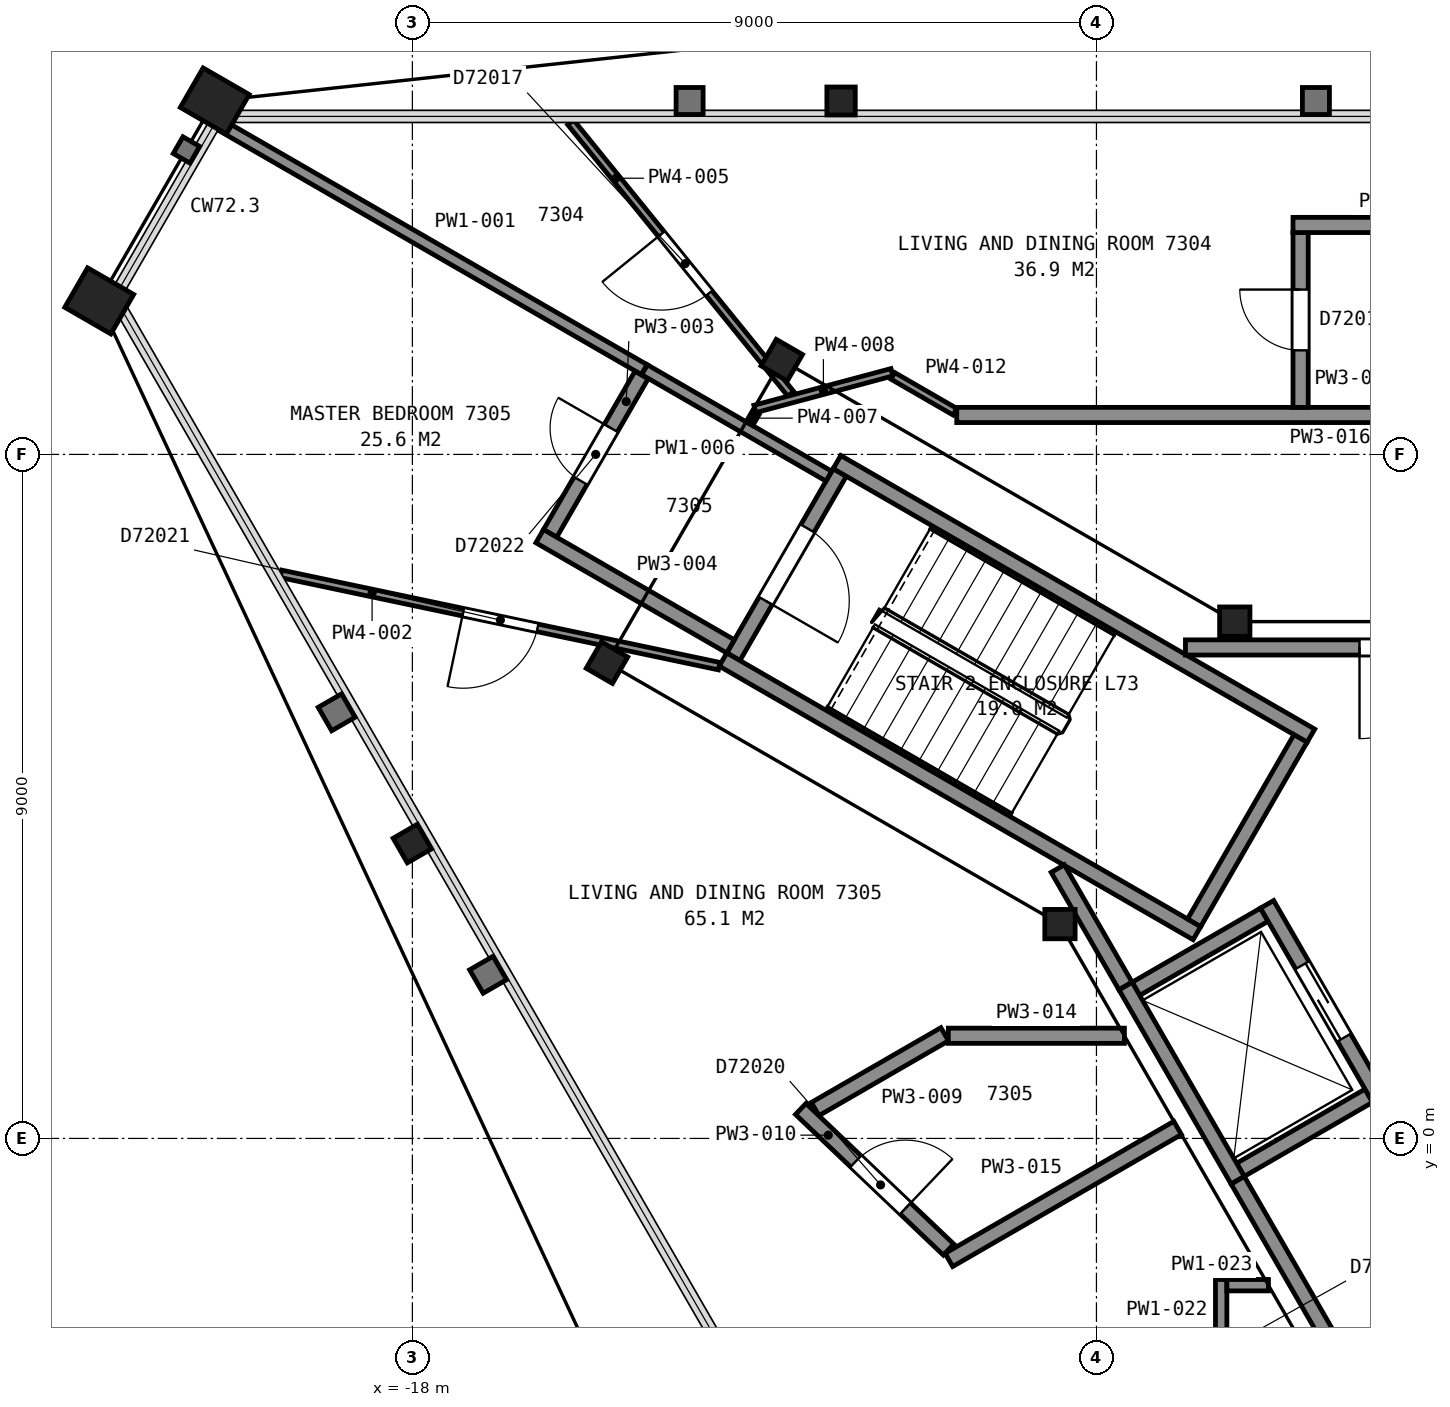
"""IFC4 building model, lengths in metres.
Left out: names, types, materials, properties, quantities, classifications, styles, units other than length and angle.
Written with IfcOpenShell. Run it as: python <this file> out.ifc"""

import sys

from ifc_helpers import new_model, si_unit, direction, frame, frame_2d, origin, origin_2d, place, context, subcontext, project, spatial, rectangle, hollow_rectangle, i_section, extrude, element, fill, save


model = new_model("IFC4")
c1 = context("Model", 3, precision=1e-05, world=origin(), true_north=direction((0.0, 1.0)))
c2 = subcontext(c1, "Body", "Model", "MODEL_VIEW")
j1 = project(units=[si_unit("LENGTHUNIT", "METRE"), si_unit("PLANEANGLEUNIT", "RADIAN")], contexts=[c1])
p1 = place(None, origin())
s1 = spatial("IfcSite", under=j1, at=p1, CompositionType="ELEMENT")
p2 = place(p1, origin())
s2 = spatial("IfcBuilding", under=s1, at=p2, CompositionType="ELEMENT")
p3 = place(p2, frame((0.0, 0.0, 289.9)))
s3 = spatial("IfcBuildingStorey", under=s2, at=p3, CompositionType="ELEMENT", Elevation=289.9)
p4 = place(p3, frame((-12.36, 13.65, 0.0), z_axis=(0.0, 0.0, 1.0), x_axis=(1.0, 0.0, 0.0)))
e1 = element("IfcColumn", 1, at=p4, inside=s3, PredefinedType="COLUMN", context=c2, shape_type="SweptSolid", body=[
    extrude(i_section(OverallWidth=0.373, OverallDepth=0.368, WebThickness=0.015, FlangeThickness=0.024, FilletRadius=0.015, at=origin_2d()), origin(), (0.0, 0.0, 1.0), 3.7),
])
for number, where, z_axis, x_axis in (
    (2, (-20.6, 13.65, 0.0), (0.0, 0.0, 1.0), (0.5, 0.866, 0.0)),
    (3, (-22.12, 11.02, 0.0), (0.0, 0.0, 1.0), (0.5, 0.866, 0.0)),
):
    element("IfcColumn", number, at=place(p3, frame(where, z_axis=z_axis, x_axis=x_axis)), inside=s3, PredefinedType="COLUMN", context=c2, shape_type="SweptSolid", body=[
        extrude(hollow_rectangle(XDim=0.6, YDim=0.7, WallThickness=0.04, at=origin_2d()), origin(), (0.0, 0.0, 1.0), 3.7),
    ])
p5 = place(p3, frame((-18.0, 3.88, 0.0), z_axis=(0.0, 0.0, 1.0), x_axis=(-0.5, 0.866025403784, 0.0)))
e4 = element("IfcColumn", 4, at=p5, inside=s3, PredefinedType="COLUMN", context=c2, shape_type="SweptSolid", body=[
    extrude(i_section(OverallWidth=0.373, OverallDepth=0.368, WebThickness=0.015, FlangeThickness=0.024, FilletRadius=0.015, at=origin_2d()), origin(), (0.0, 0.0, 1.0), 3.7),
])
p6 = place(p3, frame((-7.18, 6.8, 0.0), z_axis=(0.0, 0.0, 1.0), x_axis=(1.0, 0.0, 0.0)))
e5 = element("IfcColumn", 5, at=p6, inside=s3, PredefinedType="COLUMN", context=c2, shape_type="SweptSolid", body=[
    extrude(i_section(OverallWidth=0.399, OverallDepth=0.386, WebThickness=0.021, FlangeThickness=0.033, FilletRadius=0.015, at=origin_2d()), origin(), (0.0, 0.0, 1.0), 3.7),
])
for number, where, z_axis, x_axis in (
    (6, (-13.14, 10.24, 0.0), (0.0, 0.0, 1.0), (0.5, 0.866, 0.0)),
    (7, (-15.44, 6.26, 0.0), (0.0, 0.0, 1.0), (0.5, 0.866, 0.0)),
):
    element("IfcColumn", number, at=place(p3, frame(where, z_axis=z_axis, x_axis=x_axis)), inside=s3, PredefinedType="COLUMN", context=c2, shape_type="SweptSolid", body=[
        extrude(i_section(OverallWidth=0.401, OverallDepth=0.399, WebThickness=0.025, FlangeThickness=0.04, FilletRadius=0.015, at=origin_2d()), origin(), (0.0, 0.0, 1.0), 3.7),
    ])
p7 = place(p3, frame((-9.48, 2.82, 0.0), z_axis=(0.0, 0.0, 1.0), x_axis=(1.0, 0.0, 0.0)))
e8 = element("IfcColumn", 8, at=p7, inside=s3, PredefinedType="COLUMN", context=c2, shape_type="SweptSolid", body=[
    extrude(i_section(OverallWidth=0.399, OverallDepth=0.386, WebThickness=0.021, FlangeThickness=0.033, FilletRadius=0.015, at=origin_2d()), origin(), (0.0, 0.0, 1.0), 3.7),
])
p8 = place(p3, frame((-12.377, 8.762, 0.0), z_axis=(0.0, 0.0, 1.0), x_axis=(-0.500049511043, -0.865996816683, 0.0)))
e9 = element("IfcWall", 9, at=p8, inside=s3, PredefinedType="PARTITIONING", context=c2, shape_type="SweptSolid", body=[
    extrude(rectangle(XDim=2.8, YDim=0.2, at=frame_2d((1.4, 0.0))), origin(), (0.0, 0.0, 1.0), 3.45),
])
p9 = place(p8, frame((0.85, 0.0, 0.0)))
e10 = element("IfcOpeningElement", 10, at=p9, cuts=e9, PredefinedType="OPENING", context=c2, shape_type="SweptSolid", body=[
    extrude(rectangle(XDim=1.1, YDim=2.1, at=frame_2d((0.55, 1.05))), frame((0.0, 0.11, 0.0), z_axis=(0.0, -1.0, 0.0), x_axis=(1.0, 0.0, 0.0)), (0.0, 0.0, 1.0), 0.22),
])
for number, where, z_axis, x_axis in (
    (11, (-7.678, 2.701, 0.0), (0.0, 0.0, 1.0), (-0.866, 0.5, 0.0)),
    (12, (-6.178, 5.299, 0.0), (0.0, 0.0, 1.0), (-0.866, 0.5, 0.0)),
):
    element("IfcWall", number, at=place(p3, frame(where, z_axis=z_axis, x_axis=x_axis)), inside=s3, PredefinedType="PARTITIONING", context=c2, shape_type="SweptSolid", body=[
        extrude(rectangle(XDim=7.2, YDim=0.2, at=frame_2d((3.6, 0.0))), origin(), (0.0, 0.0, 1.0), 3.45),
    ])
p10 = place(p3, frame((-6.315, 5.262, 0.0), z_axis=(0.0, 0.0, 1.0), x_axis=(-0.500049511043, -0.865996816683, 0.0)))
e13 = element("IfcWall", 13, at=p10, inside=s3, PredefinedType="PARTITIONING", context=c2, shape_type="SweptSolid", body=[
    extrude(rectangle(XDim=2.8, YDim=0.2, at=frame_2d((1.4, 0.0))), origin(), (0.0, 0.0, 1.0), 3.45),
])
for number, where, z_axis, x_axis in (
    (14, (-7.105, -0.413, 0.0), (0.0, 0.0, 1.0), (0.866, 0.5, 0.0)),
    (15, (-8.48, 1.969, 0.0), (0.0, 0.0, 1.0), (0.866, 0.5, 0.0)),
):
    element("IfcWall", number, at=place(p3, frame(where, z_axis=z_axis, x_axis=x_axis)), inside=s3, PredefinedType="PARTITIONING", context=c2, shape_type="SweptSolid", body=[
        extrude(rectangle(XDim=1.95, YDim=0.2, at=frame_2d((0.975, 0.0))), origin(), (0.0, 0.0, 1.0), 3.7),
    ])
p11 = place(p3, frame((-5.28, 0.525, 0.0), z_axis=(0.0, 0.0, 1.0), x_axis=(-0.500037662692, 0.866003658127, 0.0)))
e16 = element("IfcWall", 16, at=p11, inside=s3, PredefinedType="PARTITIONING", context=c2, shape_type="SweptSolid", body=[
    extrude(rectangle(XDim=2.95, YDim=0.2, at=frame_2d((1.475, 0.0))), origin(), (0.0, 0.0, 1.0), 3.7),
])
p12 = place(p11, frame((0.925, 0.0, 0.0)))
e17 = element("IfcOpeningElement", 17, at=p12, cuts=e16, PredefinedType="OPENING", context=c2, shape_type="SweptSolid", body=[
    extrude(rectangle(XDim=1.1, YDim=2.1, at=frame_2d((0.55, 1.05))), frame((0.0, 0.11, 0.0), z_axis=(0.0, -1.0, 0.0), x_axis=(1.0, 0.0, 0.0)), (0.0, 0.0, 1.0), 0.22),
])
p13 = place(p3, frame((-7.142, -0.55, 0.0), z_axis=(0.0, 0.0, 1.0), x_axis=(-0.49997559174, 0.866039495442, 0.0)))
e18 = element("IfcWall", 18, at=p13, inside=s3, PredefinedType="PARTITIONING", context=c2, shape_type="SweptSolid", body=[
    extrude(rectangle(XDim=2.95, YDim=0.2, at=frame_2d((1.475, 0.0))), origin(), (0.0, 0.0, 1.0), 3.7),
])
p14 = place(p3, frame((-9.509, 3.551, 0.0), z_axis=(0.0, 0.0, 1.0), x_axis=(0.499999136801, -0.866025902152, 0.0)))
e19 = element("IfcWall", 19, at=p14, inside=s3, PredefinedType="PARTITIONING", context=c2, shape_type="SweptSolid", body=[
    extrude(rectangle(XDim=1.782, YDim=0.2, at=frame_2d((0.891, 0.0))), origin(), (0.0, 0.0, 1.0), 3.45),
])
p15 = place(p3, frame((7.829, 6.46, 0.0), z_axis=(0.0, 0.0, 1.0), x_axis=(-1.0, 0.0, 0.0)))
e20 = element("IfcWall", 20, at=p15, inside=s3, PredefinedType="PARTITIONING", context=c2, shape_type="SweptSolid", body=[
    extrude(rectangle(XDim=15.658, YDim=0.2, at=frame_2d((7.829, 0.0))), origin(), (0.0, 0.0, 1.0), 3.45),
])
p16 = place(p15, frame((12.168, 0.0, 0.0)))
e21 = element("IfcOpeningElement", 21, at=p16, cuts=e20, PredefinedType="OPENING", context=c2, shape_type="SweptSolid", body=[
    extrude(rectangle(XDim=1.2, YDim=2.1, at=frame_2d((0.6, 1.05))), frame((0.0, 0.11, 0.0), z_axis=(0.0, -1.0, 0.0), x_axis=(1.0, 0.0, 0.0)), (0.0, 0.0, 1.0), 0.22),
])
p17 = place(p3, frame((-7.141, -0.551, 0.0), z_axis=(0.0, 0.0, 1.0), x_axis=(0.500001302854, -0.86602465158, 0.0)))
e22 = element("IfcWall", 22, at=p17, inside=s3, PredefinedType="PARTITIONING", context=c2, shape_type="SweptSolid", body=[
    extrude(rectangle(XDim=6.846, YDim=0.2, at=frame_2d((3.423, 0.0))), origin(), (0.0, 0.0, 1.0), 3.45),
])
p18 = place(p17, frame((5.0, 0.0, 0.0)))
e23 = element("IfcOpeningElement", 23, at=p18, cuts=e22, PredefinedType="OPENING", context=c2, shape_type="SweptSolid", body=[
    extrude(rectangle(XDim=1.2, YDim=2.1, at=frame_2d((0.6, 1.05))), frame((0.0, 0.11, 0.0), z_axis=(0.0, -1.0, 0.0), x_axis=(1.0, 0.0, 0.0)), (0.0, 0.0, 1.0), 0.22),
])
p19 = place(p3, frame((-20.506, 13.324, 0.0), z_axis=(0.0, 0.0, 1.0), x_axis=(0.866004971522, -0.500035388047, 0.0)))
e24 = element("IfcWall", 24, at=p19, inside=s3, PredefinedType="PARTITIONING", context=c2, shape_type="SweptSolid", body=[
    extrude(rectangle(XDim=6.416, YDim=0.15, at=frame_2d((3.208, 0.0))), origin(), (0.0, 0.0, 1.0), 2.723),
])
p20 = place(p3, frame((-19.729, 7.428, 0.0), z_axis=(0.0, 0.0, 1.0), x_axis=(0.97852427483, -0.206131617102, 0.0)))
e25 = element("IfcWall", 25, at=p20, inside=s3, PredefinedType="PARTITIONING", context=c2, shape_type="SweptSolid", body=[
    extrude(rectangle(XDim=5.891, YDim=0.1, at=frame_2d((2.946, 0.0))), origin(), (0.0, 0.0, 1.0), 2.723),
])
p21 = place(p20, frame((2.45, 0.0, 0.0)))
e26 = element("IfcOpeningElement", 26, at=p21, cuts=e25, PredefinedType="OPENING", context=c2, shape_type="SweptSolid", body=[
    extrude(rectangle(XDim=1.0, YDim=2.1, at=frame_2d((0.5, 1.05))), frame((0.0, 0.06, 0.0), z_axis=(0.0, -1.0, 0.0), x_axis=(1.0, 0.0, 0.0)), (0.0, 0.0, 1.0), 0.12),
])
p22 = place(p3, frame((-14.985, 10.045, 0.0), z_axis=(0.0, 0.0, 1.0), x_axis=(-0.499903970786, -0.866080839178, 0.0)))
e27 = element("IfcWall", 27, at=p22, inside=s3, PredefinedType="PARTITIONING", context=c2, shape_type="SweptSolid", body=[
    extrude(rectangle(XDim=2.406, YDim=0.2, at=frame_2d((1.203, 0.0))), origin(), (0.0, 0.0, 1.0), 2.723),
])
p23 = place(p22, frame((0.806, 0.0, 0.0)))
e28 = element("IfcOpeningElement", 28, at=p23, cuts=e27, PredefinedType="OPENING", context=c2, shape_type="SweptSolid", body=[
    extrude(rectangle(XDim=0.8, YDim=2.1, at=frame_2d((0.4, 1.05))), frame((0.0, 0.11, 0.0), z_axis=(0.0, -1.0, 0.0), x_axis=(1.0, 0.0, 0.0)), (0.0, 0.0, 1.0), 0.22),
])
p24 = place(p3, frame((-16.325, 7.924, 0.0), z_axis=(0.0, 0.0, 1.0), x_axis=(0.865969617579, -0.500096612097, 0.0)))
e29 = element("IfcWall", 29, at=p24, inside=s3, PredefinedType="PARTITIONING", context=c2, shape_type="SweptSolid", body=[
    extrude(rectangle(XDim=2.899, YDim=0.2, at=frame_2d((1.45, 0.0))), origin(), (0.0, 0.0, 1.0), 2.723),
])
p25 = place(p3, frame((-13.021, 9.797, 0.0), z_axis=(0.0, 0.0, 1.0), x_axis=(-0.629738754572, 0.776806990822, 0.0)))
e30 = element("IfcWall", 30, at=p25, inside=s3, PredefinedType="PARTITIONING", context=c2, shape_type="SweptSolid", body=[
    extrude(rectangle(XDim=4.598, YDim=0.1, at=frame_2d((2.299, 0.0))), origin(), (0.0, 0.0, 1.0), 2.723),
])
p26 = place(p25, frame((1.706, 0.0, 0.0)))
e31 = element("IfcOpeningElement", 31, at=p26, cuts=e30, PredefinedType="OPENING", context=c2, shape_type="SweptSolid", body=[
    extrude(rectangle(XDim=1.0, YDim=2.1, at=frame_2d((0.5, 1.05))), frame((0.0, 0.06, 0.0), z_axis=(0.0, -1.0, 0.0), x_axis=(1.0, 0.0, 0.0)), (0.0, 0.0, 1.0), 0.12),
])
p27 = place(p3, frame((-14.945, 10.114, 0.0), z_axis=(0.0, 0.0, 1.0), x_axis=(0.865969158485, -0.500097407065, 0.0)))
e32 = element("IfcWall", 32, at=p27, inside=s3, PredefinedType="PARTITIONING", context=c2, shape_type="SweptSolid", body=[
    extrude(rectangle(XDim=2.799, YDim=0.15, at=frame_2d((1.4, 0.0))), origin(), (0.0, 0.0, 1.0), 2.723),
])
p28 = place(p3, frame((-13.565, 9.404, 0.0), z_axis=(0.0, 0.0, 1.0), x_axis=(0.500181256421, 0.865920730047, 0.0)))
e33 = element("IfcWall", 33, at=p28, inside=s3, PredefinedType="PARTITIONING", context=c2, shape_type="SweptSolid", body=[
    extrude(rectangle(XDim=0.169, YDim=0.1, at=frame_2d((0.084, 0.0))), origin(), (0.0, 0.0, 1.0), 2.723),
])
p29 = place(p3, frame((-13.494, 9.598, 0.0), z_axis=(0.0, 0.0, 1.0), x_axis=(0.96601104623, 0.258500790254, 0.0)))
e34 = element("IfcWall", 34, at=p29, inside=s3, PredefinedType="PARTITIONING", context=c2, shape_type="SweptSolid", body=[
    extrude(rectangle(XDim=1.867, YDim=0.1, at=frame_2d((0.934, 0.0))), origin(), (0.0, 0.0, 1.0), 2.723),
])
p30 = place(p3, frame((-12.701, 0.386, 0.0), z_axis=(0.0, 0.0, 1.0), x_axis=(0.866028603765, 0.49999445743, 0.0)))
e35 = element("IfcWall", 35, at=p30, inside=s3, PredefinedType="PARTITIONING", context=c2, shape_type="SweptSolid", body=[
    extrude(rectangle(XDim=1.968, YDim=0.2, at=frame_2d((0.984, 0.0))), origin(), (0.0, 0.0, 1.0), 2.723),
])
p31 = place(p3, frame((-12.89, 0.388, 0.0), z_axis=(0.0, 0.0, 1.0), x_axis=(0.724395225918, -0.689384911836, 0.0)))
e36 = element("IfcWall", 36, at=p31, inside=s3, PredefinedType="PARTITIONING", context=c2, shape_type="SweptSolid", body=[
    extrude(rectangle(XDim=2.685, YDim=0.2, at=frame_2d((1.342, 0.0))), origin(), (0.0, 0.0, 1.0), 2.723),
])
p32 = place(p31, frame((1.0, 0.0, 0.0)))
e37 = element("IfcOpeningElement", 37, at=p32, cuts=e36, PredefinedType="OPENING", context=c2, shape_type="SweptSolid", body=[
    extrude(rectangle(XDim=0.9, YDim=2.1, at=frame_2d((0.45, 1.05))), frame((0.0, 0.11, 0.0), z_axis=(0.0, -1.0, 0.0), x_axis=(1.0, 0.0, 0.0)), (0.0, 0.0, 1.0), 0.22),
])
p33 = place(p3, frame((-11.678, 10.033, 0.0), z_axis=(0.0, 0.0, 1.0), x_axis=(0.866116627388, -0.499841962787, 0.0)))
e38 = element("IfcWall", 38, at=p33, inside=s3, PredefinedType="PARTITIONING", context=c2, shape_type="SweptSolid", body=[
    extrude(rectangle(XDim=0.943, YDim=0.1, at=frame_2d((0.472, 0.0))), origin(), (0.0, 0.0, 1.0), 2.723),
])
p34 = place(p3, frame((-10.949, 1.351, 0.0), z_axis=(0.0, 0.0, 1.0), x_axis=(1.0, 0.0, 0.0)))
e39 = element("IfcWall", 39, at=p34, inside=s3, PredefinedType="PARTITIONING", context=c2, shape_type="SweptSolid", body=[
    extrude(rectangle(XDim=2.317, YDim=0.2, at=frame_2d((1.158, 0.0))), origin(), (0.0, 0.0, 1.0), 2.723),
])
p35 = place(p3, frame((-10.942, -1.599, 0.0), z_axis=(0.0, 0.0, 1.0), x_axis=(0.866134116492, 0.499811656775, 0.0)))
e40 = element("IfcWall", 40, at=p35, inside=s3, PredefinedType="PARTITIONING", context=c2, shape_type="SweptSolid", body=[
    extrude(rectangle(XDim=3.475, YDim=0.2, at=frame_2d((1.737, 0.0))), origin(), (0.0, 0.0, 1.0), 2.723),
])
p36 = place(p3, frame((-10.838, 9.519, 0.0), z_axis=(0.0, 0.0, 1.0), x_axis=(1.0, 0.0, 0.0)))
e41 = element("IfcWall", 41, at=p36, inside=s3, PredefinedType="PARTITIONING", context=c2, shape_type="SweptSolid", body=[
    extrude(rectangle(XDim=9.824, YDim=0.2, at=frame_2d((4.912, 0.0))), origin(), (0.0, 0.0, 1.0), 2.723),
])
p37 = place(p3, frame((-7.359, -2.664, 0.0), z_axis=(0.0, 0.0, 1.0), x_axis=(0.0, 1.0, 0.0)))
e42 = element("IfcWall", 42, at=p37, inside=s3, PredefinedType="PARTITIONING", context=c2, shape_type="SweptSolid", body=[
    extrude(rectangle(XDim=0.808, YDim=0.15, at=frame_2d((0.404, 0.0))), origin(), (0.0, 0.0, 1.0), 2.723),
])
p38 = place(p3, frame((-7.284, -1.931, 0.0), z_axis=(0.0, 0.0, 1.0), x_axis=(1.0, 0.0, 0.0)))
e43 = element("IfcWall", 43, at=p38, inside=s3, PredefinedType="PARTITIONING", context=c2, shape_type="SweptSolid", body=[
    extrude(rectangle(XDim=0.547, YDim=0.15, at=frame_2d((0.273, 0.0))), origin(), (0.0, 0.0, 1.0), 2.723),
])
p39 = place(p3, frame((-6.314, 11.919, 0.0), z_axis=(0.0, 0.0, 1.0), x_axis=(0.0, -1.0, 0.0)))
e44 = element("IfcWall", 44, at=p39, inside=s3, PredefinedType="PARTITIONING", context=c2, shape_type="SweptSolid", body=[
    extrude(rectangle(XDim=2.3, YDim=0.2, at=frame_2d((1.15, 0.0))), origin(), (0.0, 0.0, 1.0), 2.723),
])
p40 = place(p39, frame((0.75, 0.0, 0.0)))
e45 = element("IfcOpeningElement", 45, at=p40, cuts=e44, PredefinedType="OPENING", context=c2, shape_type="SweptSolid", body=[
    extrude(rectangle(XDim=0.8, YDim=2.1, at=frame_2d((0.4, 1.05))), frame((0.0, 0.11, 0.0), z_axis=(0.0, -1.0, 0.0), x_axis=(1.0, 0.0, 0.0)), (0.0, 0.0, 1.0), 0.22),
])
p41 = place(p3, frame((-6.414, 12.019, 0.0), z_axis=(0.0, 0.0, 1.0), x_axis=(1.0, 0.0, 0.0)))
e46 = element("IfcWall", 46, at=p41, inside=s3, PredefinedType="PARTITIONING", context=c2, shape_type="SweptSolid", body=[
    extrude(rectangle(XDim=2.8, YDim=0.2, at=frame_2d((1.4, 0.0))), origin(), (0.0, 0.0, 1.0), 2.723),
])
p42 = place(p9, origin())
e47 = element("IfcDoor", 47, at=p42, inside=s3, OperationType="SINGLE_SWING_RIGHT", PredefinedType="DOOR", context=c2, shape_type="SweptSolid", body=[
    extrude(rectangle(XDim=1.1, YDim=2.1, at=frame_2d((0.55, 1.05))), frame((0.0, 0.025, 0.0), z_axis=(0.0, -1.0, 0.0), x_axis=(1.0, 0.0, 0.0)), (0.0, 0.0, 1.0), 0.05),
])
fill(e10, e47)
p43 = place(p12, origin())
e48 = element("IfcDoor", 48, at=p43, inside=s3, OperationType="SLIDING_TO_LEFT", PredefinedType="DOOR", context=c2, shape_type="SweptSolid", body=[
    extrude(rectangle(XDim=1.1, YDim=2.1, at=frame_2d((0.55, 1.05))), frame((0.0, 0.025, 0.0), z_axis=(0.0, -1.0, 0.0), x_axis=(1.0, 0.0, 0.0)), (0.0, 0.0, 1.0), 0.05),
])
fill(e17, e48)
p44 = place(p16, origin())
e49 = element("IfcDoor", 49, at=p44, inside=s3, OperationType="SINGLE_SWING_RIGHT", PredefinedType="DOOR", context=c2, shape_type="SweptSolid", body=[
    extrude(rectangle(XDim=1.2, YDim=2.1, at=frame_2d((0.6, 1.05))), frame((0.0, 0.025, 0.0), z_axis=(0.0, -1.0, 0.0), x_axis=(1.0, 0.0, 0.0)), (0.0, 0.0, 1.0), 0.05),
])
fill(e21, e49)
p45 = place(p21, origin())
e50 = element("IfcDoor", 50, at=p45, inside=s3, OperationType="SINGLE_SWING_LEFT", PredefinedType="DOOR", context=c2, shape_type="SweptSolid", body=[
    extrude(rectangle(XDim=1.0, YDim=2.1, at=frame_2d((0.5, 1.05))), frame((0.0, 0.025, 0.0), z_axis=(0.0, -1.0, 0.0), x_axis=(1.0, 0.0, 0.0)), (0.0, 0.0, 1.0), 0.05),
])
fill(e26, e50)
p46 = place(p23, origin())
e51 = element("IfcDoor", 51, at=p46, inside=s3, OperationType="SINGLE_SWING_LEFT", PredefinedType="DOOR", context=c2, shape_type="SweptSolid", body=[
    extrude(rectangle(XDim=0.8, YDim=2.1, at=frame_2d((0.4, 1.05))), frame((0.0, 0.025, 0.0), z_axis=(0.0, -1.0, 0.0), x_axis=(1.0, 0.0, 0.0)), (0.0, 0.0, 1.0), 0.05),
])
fill(e28, e51)
p47 = place(p26, origin())
e52 = element("IfcDoor", 52, at=p47, inside=s3, OperationType="SINGLE_SWING_RIGHT", PredefinedType="DOOR", context=c2, shape_type="SweptSolid", body=[
    extrude(rectangle(XDim=1.0, YDim=2.1, at=frame_2d((0.5, 1.05))), frame((0.0, 0.025, 0.0), z_axis=(0.0, -1.0, 0.0), x_axis=(1.0, 0.0, 0.0)), (0.0, 0.0, 1.0), 0.05),
])
fill(e31, e52)
p48 = place(p32, origin())
e53 = element("IfcDoor", 53, at=p48, inside=s3, OperationType="SINGLE_SWING_RIGHT", PredefinedType="DOOR", context=c2, shape_type="SweptSolid", body=[
    extrude(rectangle(XDim=0.9, YDim=2.1, at=frame_2d((0.45, 1.05))), frame((0.0, 0.025, 0.0), z_axis=(0.0, -1.0, 0.0), x_axis=(1.0, 0.0, 0.0)), (0.0, 0.0, 1.0), 0.05),
])
fill(e37, e53)
p49 = place(p40, origin())
e54 = element("IfcDoor", 54, at=p49, inside=s3, OperationType="SINGLE_SWING_LEFT", PredefinedType="DOOR", context=c2, shape_type="SweptSolid", body=[
    extrude(rectangle(XDim=0.8, YDim=2.1, at=frame_2d((0.4, 1.05))), frame((0.0, 0.025, 0.0), z_axis=(0.0, -1.0, 0.0), x_axis=(1.0, 0.0, 0.0)), (0.0, 0.0, 1.0), 0.05),
])
fill(e45, e54)
save(model, sys.argv[1])
